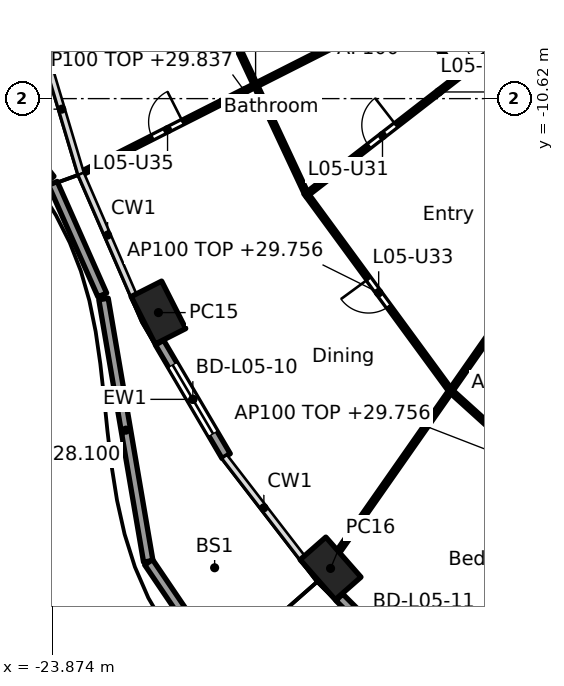
"""IFC4 building model, lengths in metres.
Left out: names, types, materials, properties, quantities, classifications, styles, units other than length and angle.
Written with IfcOpenShell. Run it as: python <this file> out.ifc"""

import sys

from ifc_helpers import new_model, si_unit, direction, frame, frame_2d, origin, origin_2d, place, context, subcontext, project, spatial, rectangle, hollow_rectangle, extrude, element, fill, save


model = new_model("IFC4")
c1 = context("Model", 3, precision=1e-05, world=origin(), true_north=direction((0.0, 1.0)))
c2 = subcontext(c1, "Body", "Model", "MODEL_VIEW")
j1 = project(units=[si_unit("LENGTHUNIT", "METRE"), si_unit("PLANEANGLEUNIT", "RADIAN")], contexts=[c1])
p1 = place(None, origin())
s1 = spatial("IfcSite", under=j1, at=p1, CompositionType="ELEMENT")
p2 = place(p1, origin())
s2 = spatial("IfcBuilding", under=s1, at=p2, CompositionType="ELEMENT")
p3 = place(p2, frame((0.0, 0.0, 27.0)))
s3 = spatial("IfcBuildingStorey", under=s2, at=p3, CompositionType="ELEMENT", Elevation=27.0)
for number, where, z_axis, x_axis in (
    (1, (-21.082, -16.25, 0.0), (0.0, 0.0, 1.0), (0.452, -0.892, 0.0)),
    (2, (-16.552, -22.981, 0.0), (0.0, 0.0, 1.0), (0.66, -0.751, 0.0)),
):
    element("IfcColumn", number, at=place(p3, frame(where, z_axis=z_axis, x_axis=x_axis)), inside=s3, PredefinedType="COLUMN", context=c2, shape_type="SweptSolid", body=[
        extrude(hollow_rectangle(XDim=1.4, YDim=0.9, WallThickness=0.05, at=origin_2d()), origin(), (0.0, 0.0, 1.0), 3.7),
    ])
p4 = place(p3, frame((-19.3, -20.026, 0.0), z_axis=(0.0, 0.0, 1.0), x_axis=(-0.506311160839, 0.862350861546, 0.0)))
e3 = element("IfcWall", 3, at=p4, inside=s3, PredefinedType="SOLIDWALL", context=c2, shape_type="SweptSolid", body=[
    extrude(rectangle(XDim=3.462, YDim=0.25, at=frame_2d((1.731, 0.0))), origin(), (0.0, 0.0, 1.0), 3.44),
])
p5 = place(p4, frame((0.681, 0.0, 0.0)))
e4 = element("IfcOpeningElement", 4, at=p5, cuts=e3, PredefinedType="OPENING", context=c2, shape_type="SweptSolid", body=[
    extrude(rectangle(XDim=2.1, YDim=2.4, at=frame_2d((1.05, 1.2))), frame((0.0, 0.135, 0.0), z_axis=(0.0, -1.0, 0.0), x_axis=(1.0, 0.0, 0.0)), (0.0, 0.0, 1.0), 0.27),
])
p6 = place(p3, frame((-13.966, -26.092, 0.0), z_axis=(0.0, 0.0, 1.0), x_axis=(-0.707803094595, 0.706409781417, 0.0)))
e5 = element("IfcWall", 5, at=p6, inside=s3, PredefinedType="SOLIDWALL", context=c2, shape_type="SweptSolid", body=[
    extrude(rectangle(XDim=3.329, YDim=0.25, at=frame_2d((1.665, 0.0))), origin(), (0.0, 0.0, 1.0), 3.44),
])
p7 = place(p6, frame((0.615, 0.0, 0.0)))
e6 = element("IfcOpeningElement", 6, at=p7, cuts=e5, PredefinedType="OPENING", context=c2, shape_type="SweptSolid", body=[
    extrude(rectangle(XDim=2.1, YDim=2.4, at=frame_2d((1.05, 1.2))), frame((0.0, 0.135, 0.0), z_axis=(0.0, -1.0, 0.0), x_axis=(1.0, 0.0, 0.0)), (0.0, 0.0, 1.0), 0.27),
])
p8 = place(p3, frame((-27.261, -8.48, 0.0), z_axis=(0.0, 0.0, 1.0), x_axis=(0.615882240598, -0.787838223061, 0.0)))
e7 = element("IfcWall", 7, at=p8, inside=s3, PredefinedType="PARAPET", context=c2, shape_type="SweptSolid", body=[
    extrude(rectangle(XDim=5.409, YDim=0.25, at=frame_2d((2.705, 0.0))), origin(), (0.0, 0.0, 1.0), 1.1),
])
p9 = place(p3, frame((-23.859, -12.849, 0.0), z_axis=(0.0, 0.0, 1.0), x_axis=(0.40486170938, -0.914377928582, 0.0)))
e8 = element("IfcWall", 8, at=p9, inside=s3, PredefinedType="PARAPET", context=c2, shape_type="SweptSolid", body=[
    extrude(rectangle(XDim=3.212, YDim=0.25, at=frame_2d((1.606, 0.0))), origin(), (0.0, 0.0, 1.0), 1.1),
])
p10 = place(p3, frame((-22.527, -15.892, 0.0), z_axis=(0.0, 0.0, 1.0), x_axis=(0.168107215642, -0.985768717321, 0.0)))
e9 = element("IfcWall", 9, at=p10, inside=s3, PredefinedType="PARAPET", context=c2, shape_type="SweptSolid", body=[
    extrude(rectangle(XDim=7.001, YDim=0.25, at=frame_2d((3.501, 0.0))), origin(), (0.0, 0.0, 1.0), 1.1),
])
p11 = place(p3, frame((-21.34, -22.818, 0.0), z_axis=(0.0, 0.0, 1.0), x_axis=(0.56093486479, -0.827859938312, 0.0)))
e10 = element("IfcWall", 10, at=p11, inside=s3, PredefinedType="PARAPET", context=c2, shape_type="SweptSolid", body=[
    extrude(rectangle(XDim=3.299, YDim=0.25, at=frame_2d((1.649, 0.0))), origin(), (0.0, 0.0, 1.0), 1.1),
])
p12 = place(p3, frame((-12.635, -5.134, 0.0), z_axis=(0.0, 0.0, 1.0), x_axis=(0.707106781187, -0.707106781187, 0.0)))
e11 = element("IfcWall", 11, at=p12, inside=s3, PredefinedType="PARTITIONING", context=c2, shape_type="SweptSolid", body=[
    extrude(rectangle(XDim=10.609, YDim=0.2, at=frame_2d((5.305, 0.0))), origin(), (0.0, 0.0, 1.0), 3.44),
])
p13 = place(p12, frame((4.804, 0.0, 0.0)))
e12 = element("IfcOpeningElement", 12, at=p13, cuts=e11, PredefinedType="OPENING", context=c2, shape_type="SweptSolid", body=[
    extrude(rectangle(XDim=1.0, YDim=2.1, at=frame_2d((0.5, 1.05))), frame((0.0, 0.11, 0.0), z_axis=(0.0, -1.0, 0.0), x_axis=(1.0, 0.0, 0.0)), (0.0, 0.0, 1.0), 0.22),
])
p14 = place(p3, frame((-15.655, -6.391, 0.0), z_axis=(0.0, 0.0, 1.0), x_axis=(0.559126445155, -0.82908239538, 0.0)))
e13 = element("IfcWall", 13, at=p14, inside=s3, PredefinedType="PARTITIONING", context=c2, shape_type="SweptSolid", body=[
    extrude(rectangle(XDim=4.358, YDim=0.1, at=frame_2d((2.179, 0.0))), origin(), (0.0, 0.0, 1.0), 3.44),
])
p15 = place(p3, frame((-19.847, -7.445, 0.0), z_axis=(0.0, 0.0, 1.0), x_axis=(0.423892287987, -0.905712607942, 0.0)))
e14 = element("IfcWall", 14, at=p15, inside=s3, PredefinedType="PARTITIONING", context=c2, shape_type="SweptSolid", body=[
    extrude(rectangle(XDim=6.238, YDim=0.1, at=frame_2d((3.119, 0.0))), origin(), (0.0, 0.0, 1.0), 2.756),
])
p16 = place(p3, frame((-14.481, -8.22, 0.0), z_axis=(0.0, 0.0, 1.0), x_axis=(-0.892232077638, -0.451577146935, 0.0)))
e15 = element("IfcWall", 15, at=p16, inside=s3, PredefinedType="PARTITIONING", context=c2, shape_type="SweptSolid", body=[
    extrude(rectangle(XDim=9.723, YDim=0.1, at=frame_2d((4.862, 0.0))), origin(), (0.0, 0.0, 1.0), 2.837),
])
p17 = place(p16, frame((6.678, 0.0, 0.0)))
e16 = element("IfcOpeningElement", 16, at=p17, cuts=e15, PredefinedType="OPENING", context=c2, shape_type="SweptSolid", body=[
    extrude(rectangle(XDim=0.9, YDim=2.1, at=frame_2d((0.45, 1.05))), frame((0.0, 0.06, 0.0), z_axis=(0.0, -1.0, 0.0), x_axis=(1.0, 0.0, 0.0)), (0.0, 0.0, 1.0), 0.12),
])
p18 = place(p3, frame((-10.19, -7.719, 0.0), z_axis=(0.0, 0.0, 1.0), x_axis=(-0.790264549439, -0.612765813259, 0.0)))
e17 = element("IfcWall", 17, at=p18, inside=s3, PredefinedType="PARTITIONING", context=c2, shape_type="SweptSolid", body=[
    extrude(rectangle(XDim=8.896, YDim=0.1, at=frame_2d((4.448, 0.0))), origin(), (0.0, 0.0, 1.0), 2.687),
])
p19 = place(p18, frame((1.448, 0.0, 0.0)))
e18 = element("IfcOpeningElement", 18, at=p19, cuts=e17, PredefinedType="OPENING", context=c2, shape_type="SweptSolid", body=[
    extrude(rectangle(XDim=0.9, YDim=2.1, at=frame_2d((0.45, 1.05))), frame((0.0, 0.06, 0.0), z_axis=(0.0, -1.0, 0.0), x_axis=(1.0, 0.0, 0.0)), (0.0, 0.0, 1.0), 0.12),
])
p20 = place(p18, frame((5.871, 0.0, 0.0)))
e19 = element("IfcOpeningElement", 19, at=p20, cuts=e17, PredefinedType="OPENING", context=c2, shape_type="SweptSolid", body=[
    extrude(rectangle(XDim=0.9, YDim=2.1, at=frame_2d((0.45, 1.05))), frame((0.0, 0.06, 0.0), z_axis=(0.0, -1.0, 0.0), x_axis=(1.0, 0.0, 0.0)), (0.0, 0.0, 1.0), 0.12),
])
p21 = place(p3, frame((-17.152, -13.18, 0.0), z_axis=(0.0, 0.0, 1.0), x_axis=(0.591222750954, -0.806508312886, 0.0)))
e20 = element("IfcWall", 20, at=p21, inside=s3, PredefinedType="PARTITIONING", context=c2, shape_type="SweptSolid", body=[
    extrude(rectangle(XDim=6.31, YDim=0.1, at=frame_2d((3.155, 0.0))), origin(), (0.0, 0.0, 1.0), 2.756),
])
p22 = place(p21, frame((2.705, 0.0, 0.0)))
e21 = element("IfcOpeningElement", 21, at=p22, cuts=e20, PredefinedType="OPENING", context=c2, shape_type="SweptSolid", body=[
    extrude(rectangle(XDim=0.9, YDim=2.1, at=frame_2d((0.45, 1.05))), frame((0.0, 0.06, 0.0), z_axis=(0.0, -1.0, 0.0), x_axis=(1.0, 0.0, 0.0)), (0.0, 0.0, 1.0), 0.12),
])
p23 = place(p3, frame((-7.715, -10.193, 0.0), z_axis=(0.0, 0.0, 1.0), x_axis=(-0.573126964124, -0.819466584428, 0.0)))
e22 = element("IfcWall", 22, at=p23, inside=s3, PredefinedType="PARTITIONING", context=c2, shape_type="SweptSolid", body=[
    extrude(rectangle(XDim=15.001, YDim=0.1, at=frame_2d((7.5, 0.0))), origin(), (0.0, 0.0, 1.0), 2.687),
])
p24 = place(p23, frame((1.678, 0.0, 0.0)))
e23 = element("IfcOpeningElement", 23, at=p24, cuts=e22, PredefinedType="OPENING", context=c2, shape_type="SweptSolid", body=[
    extrude(rectangle(XDim=0.9, YDim=2.1, at=frame_2d((0.45, 1.05))), frame((0.0, 0.06, 0.0), z_axis=(0.0, -1.0, 0.0), x_axis=(1.0, 0.0, 0.0)), (0.0, 0.0, 1.0), 0.12),
])
p25 = place(p23, frame((6.631, 0.0, 0.0)))
e24 = element("IfcOpeningElement", 24, at=p25, cuts=e22, PredefinedType="OPENING", context=c2, shape_type="SweptSolid", body=[
    extrude(rectangle(XDim=0.9, YDim=2.1, at=frame_2d((0.45, 1.05))), frame((0.0, 0.06, 0.0), z_axis=(0.0, -1.0, 0.0), x_axis=(1.0, 0.0, 0.0)), (0.0, 0.0, 1.0), 0.12),
])
p26 = place(p3, frame((-13.355, -18.343, 0.0), z_axis=(0.0, 0.0, 1.0), x_axis=(0.741713303551, -0.670717060567, 0.0)))
e25 = element("IfcWall", 25, at=p26, inside=s3, PredefinedType="PARTITIONING", context=c2, shape_type="SweptSolid", body=[
    extrude(rectangle(XDim=6.059, YDim=0.1, at=frame_2d((3.03, 0.0))), origin(), (0.0, 0.0, 1.0), 2.756),
])
p27 = place(p26, frame((2.58, 0.0, 0.0)))
e26 = element("IfcOpeningElement", 26, at=p27, cuts=e25, PredefinedType="OPENING", context=c2, shape_type="SweptSolid", body=[
    extrude(rectangle(XDim=0.9, YDim=2.1, at=frame_2d((0.45, 1.05))), frame((0.0, 0.06, 0.0), z_axis=(0.0, -1.0, 0.0), x_axis=(1.0, 0.0, 0.0)), (0.0, 0.0, 1.0), 0.12),
])
p28 = place(p5, origin())
e27 = element("IfcDoor", 27, at=p28, inside=s3, OperationType="SLIDING_TO_LEFT", PredefinedType="DOOR", context=c2, shape_type="SweptSolid", body=[
    extrude(rectangle(XDim=2.1, YDim=2.4, at=frame_2d((1.05, 1.2))), frame((0.0, 0.025, 0.0), z_axis=(0.0, -1.0, 0.0), x_axis=(1.0, 0.0, 0.0)), (0.0, 0.0, 1.0), 0.05),
])
fill(e4, e27)
p29 = place(p3, frame((0.0, 0.0, -0.25)))
p30 = place(p29, frame((-25.625, -24.282, 0.0), z_axis=(0.0, 0.0, 1.0), x_axis=(0.559077142538, -0.829115642532, 0.0)))
p31 = place(p30, frame((0.0, 0.0, 0.2)))
e28 = element("IfcWindow", 28, at=p31, inside=s3, PartitioningType="SINGLE_PANEL", PredefinedType="SKYLIGHT", context=c2, shape_type="SweptSolid", body=[
    extrude(rectangle(XDim=4.0, YDim=2.0, at=origin_2d()), origin(), (0.0, 0.0, 1.0), 1.25),
])
p32 = place(p20, frame((0.9, 0.0, 0.0), x_axis=(-1.0, 0.0, 0.0)))
e29 = element("IfcDoor", 29, at=p32, inside=s3, OperationType="SINGLE_SWING_RIGHT", PredefinedType="DOOR", context=c2, shape_type="SweptSolid", body=[
    extrude(rectangle(XDim=0.9, YDim=2.1, at=frame_2d((0.45, 1.05))), frame((0.0, 0.025, 0.0), z_axis=(0.0, -1.0, 0.0), x_axis=(1.0, 0.0, 0.0)), (0.0, 0.0, 1.0), 0.05),
])
fill(e19, e29)
p33 = place(p22, frame((0.9, 0.0, 0.0), x_axis=(-1.0, 0.0, 0.0)))
e30 = element("IfcDoor", 30, at=p33, inside=s3, OperationType="SINGLE_SWING_RIGHT", PredefinedType="DOOR", context=c2, shape_type="SweptSolid", body=[
    extrude(rectangle(XDim=0.9, YDim=2.1, at=frame_2d((0.45, 1.05))), frame((0.0, 0.025, 0.0), z_axis=(0.0, -1.0, 0.0), x_axis=(1.0, 0.0, 0.0)), (0.0, 0.0, 1.0), 0.05),
])
fill(e21, e30)
p34 = place(p17, frame((0.9, 0.0, 0.0), x_axis=(-1.0, 0.0, 0.0)))
e31 = element("IfcDoor", 31, at=p34, inside=s3, OperationType="SINGLE_SWING_RIGHT", PredefinedType="DOOR", context=c2, shape_type="SweptSolid", body=[
    extrude(rectangle(XDim=0.9, YDim=2.1, at=frame_2d((0.45, 1.05))), frame((0.0, 0.025, 0.0), z_axis=(0.0, -1.0, 0.0), x_axis=(1.0, 0.0, 0.0)), (0.0, 0.0, 1.0), 0.05),
])
fill(e16, e31)
save(model, sys.argv[1])
